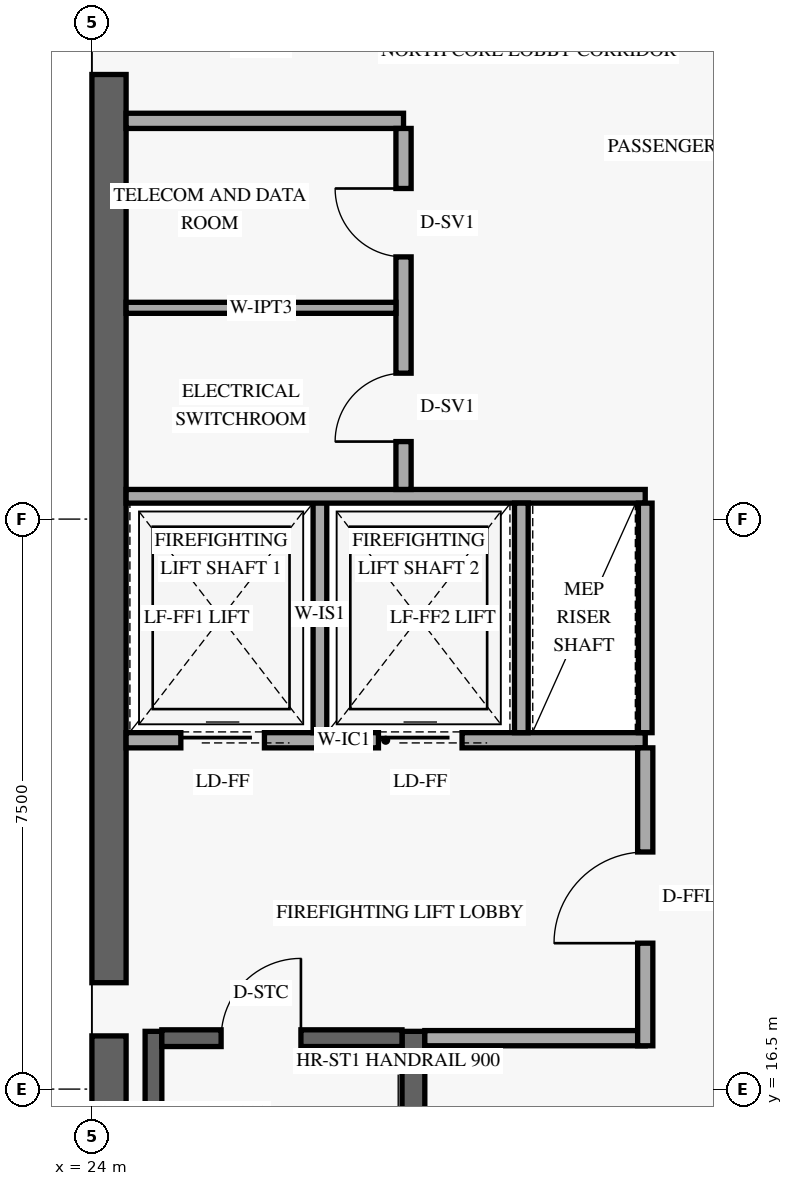
"""IFC4 building model, lengths in metres.
Left out: names, types, materials, properties, quantities, classifications, styles, units other than length and angle.
Written with IfcOpenShell. Run it as: python <this file> out.ifc"""

import sys

from ifc_helpers import new_model, si_unit, direction, frame, frame_2d, origin, origin_2d, place, context, subcontext, project, spatial, rectangle, extrude, element, fill, save


model = new_model("IFC4")
c1 = context("Model", 3, precision=1e-05, world=origin(), true_north=direction((0.0, 1.0)))
c2 = subcontext(c1, "Body", "Model", "MODEL_VIEW")
j1 = project(units=[si_unit("LENGTHUNIT", "METRE"), si_unit("PLANEANGLEUNIT", "RADIAN")], contexts=[c1])
p1 = place(None, origin())
s1 = spatial("IfcSite", under=j1, at=p1, CompositionType="ELEMENT")
p2 = place(p1, origin())
s2 = spatial("IfcBuilding", under=s1, at=p2, CompositionType="ELEMENT")
p3 = place(p2, frame((0.0, 0.0, 209.4)))
s3 = spatial("IfcBuildingStorey", under=s2, at=p3, CompositionType="ELEMENT", Elevation=209.4)
p4 = place(p3, frame((24.225, 9.6, 0.0), z_axis=(0.0, 0.0, 1.0), x_axis=(0.0, 1.0, 0.0)))
e1 = element("IfcWall", 1, at=p4, inside=s3, PredefinedType="SHEAR", context=c2, shape_type="SweptSolid", body=[
    extrude(rectangle(XDim=7.6, YDim=0.45, at=frame_2d((3.8, 0.0))), origin(), (0.0, 0.0, 1.0), 2.821),
])
p5 = place(p3, frame((24.225, 17.9, 0.0), z_axis=(0.0, 0.0, 1.0), x_axis=(0.0, 1.0, 0.0)))
e2 = element("IfcWall", 2, at=p5, inside=s3, PredefinedType="SHEAR", context=c2, shape_type="SweptSolid", body=[
    extrude(rectangle(XDim=11.95, YDim=0.45, at=frame_2d((5.975, 0.0))), origin(), (0.0, 0.0, 1.0), 2.821),
])
p6 = place(p3, frame((24.81, 9.5, 0.0), z_axis=(0.0, 0.0, 1.0), x_axis=(0.0, 1.0, 0.0)))
e3 = element("IfcWall", 3, at=p6, inside=s3, PredefinedType="SHEAR", context=c2, shape_type="SweptSolid", body=[
    extrude(rectangle(XDim=7.76, YDim=0.22, at=frame_2d((3.88, 0.0))), origin(), (0.0, 0.0, 1.0), 3.36),
])
p7 = place(p3, frame((28.23, 9.5, 0.0), z_axis=(0.0, 0.0, 1.0), x_axis=(0.0, 1.0, 0.0)))
e4 = element("IfcWall", 4, at=p7, inside=s3, PredefinedType="SHEAR", context=c2, shape_type="SweptSolid", body=[
    extrude(rectangle(XDim=7.76, YDim=0.3, at=frame_2d((3.88, 0.0))), origin(), (0.0, 0.0, 1.0), 3.36),
])
p8 = place(p3, frame((24.92, 17.17, 0.0), z_axis=(0.0, 0.0, 1.0), x_axis=(1.0, 0.0, 0.0)))
e5 = element("IfcWall", 5, at=p8, inside=s3, PredefinedType="SHEAR", context=c2, shape_type="SweptSolid", body=[
    extrude(rectangle(XDim=3.16, YDim=0.22, at=frame_2d((1.58, 0.0))), origin(), (0.0, 0.0, 1.0), 3.36),
])
p9 = place(p8, frame((0.78, 0.0, 0.0)))
e6 = element("IfcOpeningElement", 6, at=p9, cuts=e5, PredefinedType="OPENING", context=c2, shape_type="SweptSolid", body=[
    extrude(rectangle(XDim=1.05, YDim=2.15, at=frame_2d((0.525, 1.075))), frame((0.0, 0.12, 0.0), z_axis=(0.0, -1.0, 0.0), x_axis=(1.0, 0.0, 0.0)), (0.0, 0.0, 1.0), 0.24),
])
for number, where, z_axis, x_axis in (
    (7, (24.2, 17.55, 0.0), (0.0, 0.0, 1.0), (1.0, 0.0, 0.0)),
    (8, (24.2, 30.2, 0.0), (0.0, 0.0, 1.0), (1.0, 0.0, 0.0)),
):
    element("IfcColumn", number, at=place(p3, frame(where, z_axis=z_axis, x_axis=x_axis)), inside=s3, PredefinedType="COLUMN", context=c2, shape_type="SweptSolid", body=[
        extrude(rectangle(XDim=0.7, YDim=0.7, at=origin_2d()), origin(), (0.0, 0.0, 1.0), 3.6),
    ])
p10 = place(p3, frame((24.45, 21.09, 0.0), z_axis=(0.0, 0.0, 1.0), x_axis=(1.0, 0.0, 0.0)))
e9 = element("IfcWall", 9, at=p10, inside=s3, PredefinedType="STANDARD", context=c2, shape_type="SweptSolid", body=[
    extrude(rectangle(XDim=6.83, YDim=0.2, at=frame_2d((3.415, 0.0))), origin(), (0.0, 0.0, 1.0), 3.36),
])
p11 = place(p10, frame((0.72, 0.0, 0.0)))
e10 = element("IfcOpeningElement", 10, at=p11, cuts=e9, PredefinedType="OPENING", context=c2, shape_type="SweptSolid", body=[
    extrude(rectangle(XDim=1.1, YDim=2.2, at=frame_2d((0.55, 1.1))), frame((0.0, 0.11, 0.0), z_axis=(0.0, -1.0, 0.0), x_axis=(1.0, 0.0, 0.0)), (0.0, 0.0, 1.0), 0.22),
])
p12 = place(p10, frame((3.32, 0.0, 0.0)))
e11 = element("IfcOpeningElement", 11, at=p12, cuts=e9, PredefinedType="OPENING", context=c2, shape_type="SweptSolid", body=[
    extrude(rectangle(XDim=1.1, YDim=2.2, at=frame_2d((0.55, 1.1))), frame((0.0, 0.11, 0.0), z_axis=(0.0, -1.0, 0.0), x_axis=(1.0, 0.0, 0.0)), (0.0, 0.0, 1.0), 0.22),
])
p13 = place(p3, frame((28.38, 17.17, 0.0), z_axis=(0.0, 0.0, 1.0), x_axis=(1.0, 0.0, 0.0)))
e12 = element("IfcWall", 12, at=p13, inside=s3, PredefinedType="STANDARD", context=c2, shape_type="SweptSolid", body=[
    extrude(rectangle(XDim=2.9, YDim=0.2, at=frame_2d((1.45, 0.0))), origin(), (0.0, 0.0, 1.0), 3.36),
])
p14 = place(p3, frame((31.28, 17.07, 0.0), z_axis=(0.0, 0.0, 1.0), x_axis=(0.0, 1.0, 0.0)))
e13 = element("IfcWall", 13, at=p14, inside=s3, PredefinedType="STANDARD", context=c2, shape_type="SweptSolid", body=[
    extrude(rectangle(XDim=3.92, YDim=0.2, at=frame_2d((1.96, 0.0))), origin(), (0.0, 0.0, 1.0), 2.803),
])
p15 = place(p14, frame((1.35, 0.0, 0.0)))
e14 = element("IfcOpeningElement", 14, at=p15, cuts=e13, PredefinedType="OPENING", context=c2, shape_type="SweptSolid", body=[
    extrude(rectangle(XDim=1.2, YDim=2.15, at=frame_2d((0.6, 1.075))), frame((0.0, 0.11, 0.0), z_axis=(0.0, -1.0, 0.0), x_axis=(1.0, 0.0, 0.0)), (0.0, 0.0, 1.0), 0.22),
])
p16 = place(p3, frame((27.0, 21.19, 0.0), z_axis=(0.0, 0.0, 1.0), x_axis=(0.0, 1.0, 0.0)))
e15 = element("IfcWall", 15, at=p16, inside=s3, PredefinedType="STANDARD", context=c2, shape_type="SweptSolid", body=[
    extrude(rectangle(XDim=3.11, YDim=0.18, at=frame_2d((1.555, 0.0))), origin(), (0.0, 0.0, 1.0), 3.36),
])
p17 = place(p3, frame((24.45, 24.3, 0.0), z_axis=(0.0, 0.0, 1.0), x_axis=(1.0, 0.0, 0.0)))
e16 = element("IfcWall", 16, at=p17, inside=s3, PredefinedType="STANDARD", context=c2, shape_type="SweptSolid", body=[
    extrude(rectangle(XDim=6.83, YDim=0.18, at=frame_2d((3.415, 0.0))), origin(), (0.0, 0.0, 1.0), 3.36),
])
for number, where, z_axis, x_axis in (
    (17, (29.65, 21.19, 0.0), (0.0, 0.0, 1.0), (0.0, 1.0, 0.0)),
    (18, (31.28, 21.19, 0.0), (0.0, 0.0, 1.0), (0.0, 1.0, 0.0)),
):
    element("IfcWall", number, at=place(p3, frame(where, z_axis=z_axis, x_axis=x_axis)), inside=s3, PredefinedType="STANDARD", context=c2, shape_type="SweptSolid", body=[
        extrude(rectangle(XDim=3.02, YDim=0.18, at=frame_2d((1.51, 0.0))), origin(), (0.0, 0.0, 1.0), 3.36),
    ])
p18 = place(p3, frame((24.45, 29.24, 0.0), z_axis=(0.0, 0.0, 1.0), x_axis=(1.0, 0.0, 0.0)))
e19 = element("IfcWall", 19, at=p18, inside=s3, PredefinedType="STANDARD", context=c2, shape_type="SweptSolid", body=[
    extrude(rectangle(XDim=3.65, YDim=0.2, at=frame_2d((1.825, 0.0))), origin(), (0.0, 0.0, 1.0), 3.36),
])
p19 = place(p3, frame((28.1, 24.39, 0.0), z_axis=(0.0, 0.0, 1.0), x_axis=(0.0, 1.0, 0.0)))
e20 = element("IfcWall", 20, at=p19, inside=s3, PredefinedType="STANDARD", context=c2, shape_type="SweptSolid", body=[
    extrude(rectangle(XDim=4.75, YDim=0.2, at=frame_2d((2.375, 0.0))), origin(), (0.0, 0.0, 1.0), 3.36),
])
p20 = place(p19, frame((0.63, 0.0, 0.0)))
e21 = element("IfcOpeningElement", 21, at=p20, cuts=e20, PredefinedType="OPENING", context=c2, shape_type="SweptSolid", body=[
    extrude(rectangle(XDim=0.9, YDim=2.1, at=frame_2d((0.45, 1.05))), frame((0.0, 0.11, 0.0), z_axis=(0.0, -1.0, 0.0), x_axis=(1.0, 0.0, 0.0)), (0.0, 0.0, 1.0), 0.22),
])
p21 = place(p19, frame((3.06, 0.0, 0.0)))
e22 = element("IfcOpeningElement", 22, at=p21, cuts=e20, PredefinedType="OPENING", context=c2, shape_type="SweptSolid", body=[
    extrude(rectangle(XDim=0.9, YDim=2.1, at=frame_2d((0.45, 1.05))), frame((0.0, 0.11, 0.0), z_axis=(0.0, -1.0, 0.0), x_axis=(1.0, 0.0, 0.0)), (0.0, 0.0, 1.0), 0.22),
])
p22 = place(p3, frame((24.45, 26.78, 0.0), z_axis=(0.0, 0.0, 1.0), x_axis=(1.0, 0.0, 0.0)))
e23 = element("IfcWall", 23, at=p22, inside=s3, PredefinedType="PARTITIONING", context=c2, shape_type="SweptSolid", body=[
    extrude(rectangle(XDim=3.55, YDim=0.145, at=frame_2d((1.775, 0.0))), origin(), (0.0, 0.0, 1.0), 3.36),
])
p23 = place(p9, frame((1.05, 0.0, 0.0), z_axis=(0.0, 0.0, 1.0), x_axis=(-1.0, 0.0, 0.0)))
e24 = element("IfcDoor", 24, at=p23, inside=s3, OperationType="SINGLE_SWING_LEFT", PredefinedType="DOOR", context=c2, shape_type="SweptSolid", body=[
    extrude(rectangle(XDim=1.05, YDim=2.15, at=frame_2d((0.525, 1.075))), frame((0.0, 0.025, 0.0), z_axis=(0.0, -1.0, 0.0), x_axis=(1.0, 0.0, 0.0)), (0.0, 0.0, 1.0), 0.05),
])
fill(e6, e24)
p24 = place(p11, origin())
e25 = element("IfcDoor", 25, at=p24, inside=s3, OperationType="SLIDING_TO_LEFT", PredefinedType="DOOR", context=c2, shape_type="SweptSolid", body=[
    extrude(rectangle(XDim=1.1, YDim=2.2, at=frame_2d((0.55, 1.1))), frame((0.0, 0.025, 0.0), z_axis=(0.0, -1.0, 0.0), x_axis=(1.0, 0.0, 0.0)), (0.0, 0.0, 1.0), 0.05),
])
fill(e10, e25)
p25 = place(p12, origin())
e26 = element("IfcDoor", 26, at=p25, inside=s3, OperationType="SLIDING_TO_LEFT", PredefinedType="DOOR", context=c2, shape_type="SweptSolid", body=[
    extrude(rectangle(XDim=1.1, YDim=2.2, at=frame_2d((0.55, 1.1))), frame((0.0, 0.025, 0.0), z_axis=(0.0, -1.0, 0.0), x_axis=(1.0, 0.0, 0.0)), (0.0, 0.0, 1.0), 0.05),
])
fill(e11, e26)
p26 = place(p15, origin())
e27 = element("IfcDoor", 27, at=p26, inside=s3, OperationType="SINGLE_SWING_LEFT", PredefinedType="DOOR", context=c2, shape_type="SweptSolid", body=[
    extrude(rectangle(XDim=1.2, YDim=2.15, at=frame_2d((0.6, 1.075))), frame((0.0, 0.025, 0.0), z_axis=(0.0, -1.0, 0.0), x_axis=(1.0, 0.0, 0.0)), (0.0, 0.0, 1.0), 0.05),
])
fill(e14, e27)
p27 = place(p20, origin())
e28 = element("IfcDoor", 28, at=p27, inside=s3, OperationType="SINGLE_SWING_LEFT", PredefinedType="DOOR", context=c2, shape_type="SweptSolid", body=[
    extrude(rectangle(XDim=0.9, YDim=2.1, at=frame_2d((0.45, 1.05))), frame((0.0, 0.025, 0.0), z_axis=(0.0, -1.0, 0.0), x_axis=(1.0, 0.0, 0.0)), (0.0, 0.0, 1.0), 0.05),
])
fill(e21, e28)
p28 = place(p21, origin())
e29 = element("IfcDoor", 29, at=p28, inside=s3, OperationType="SINGLE_SWING_RIGHT", PredefinedType="DOOR", context=c2, shape_type="SweptSolid", body=[
    extrude(rectangle(XDim=0.9, YDim=2.1, at=frame_2d((0.45, 1.05))), frame((0.0, 0.025, 0.0), z_axis=(0.0, -1.0, 0.0), x_axis=(1.0, 0.0, 0.0)), (0.0, 0.0, 1.0), 0.05),
])
fill(e22, e29)
save(model, sys.argv[1])
